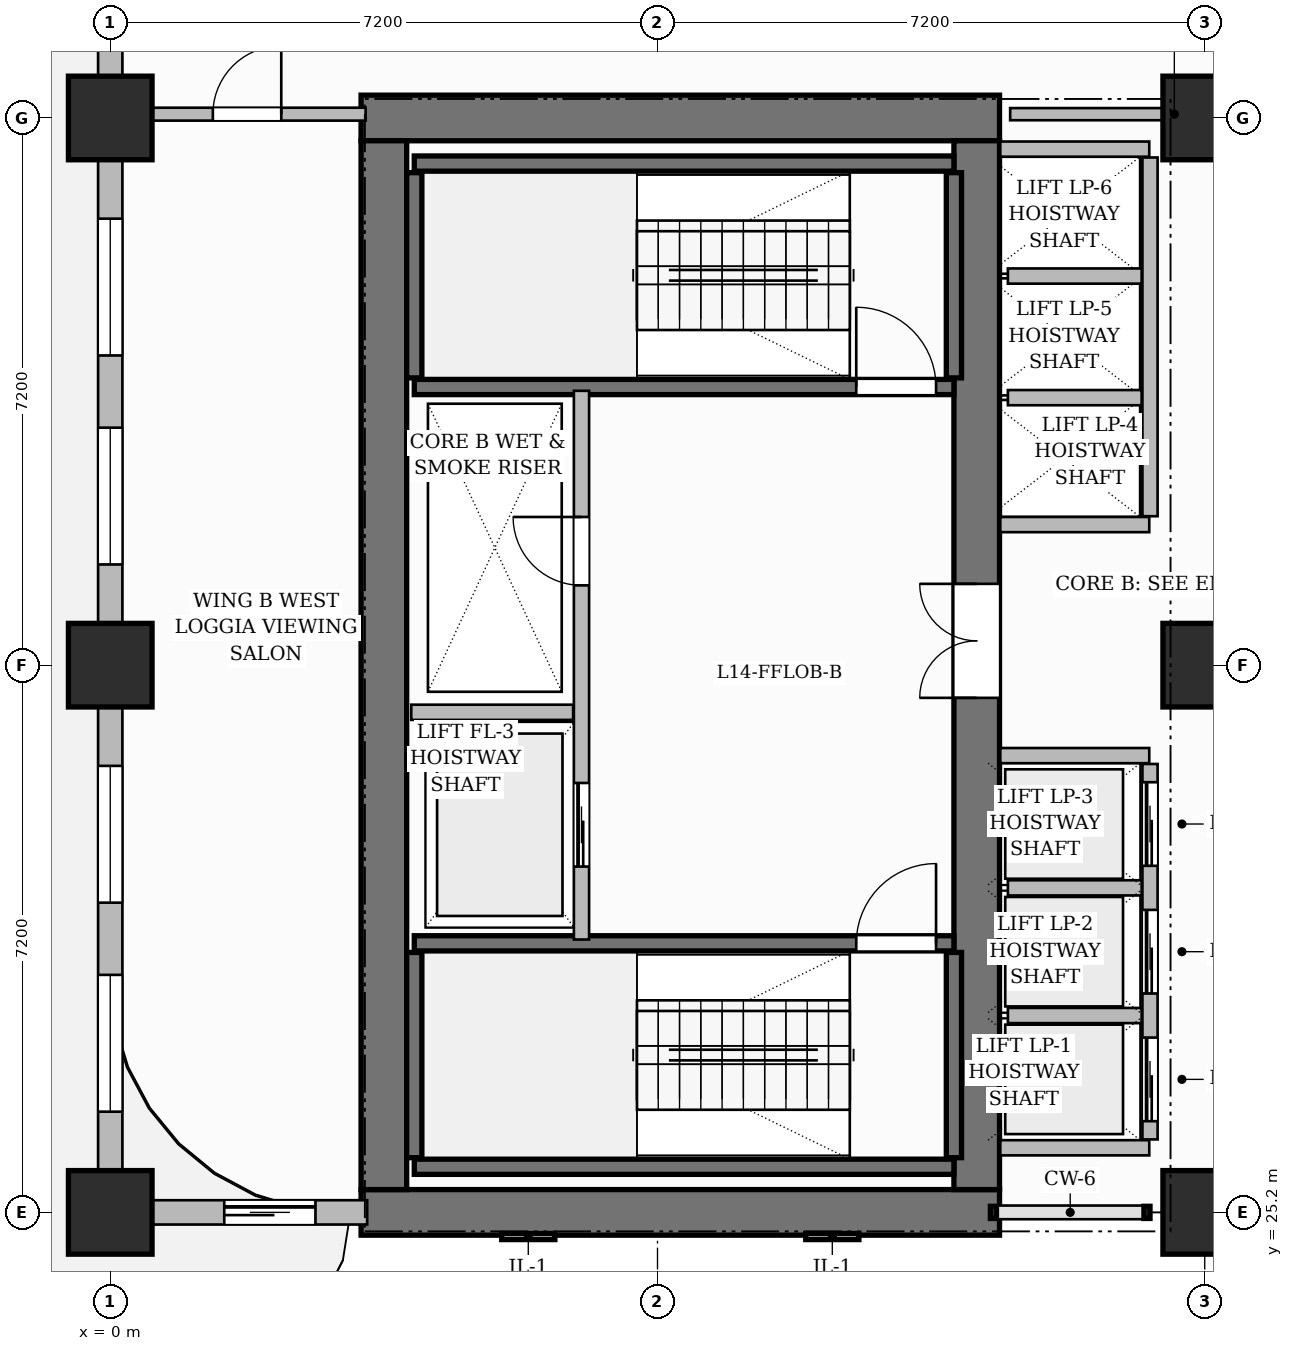
"""IFC4 building model, lengths in metres.
Left out: names, types, materials, properties, quantities, classifications, styles, units other than length and angle.
Written with IfcOpenShell. Run it as: python <this file> out.ifc"""

import sys

from ifc_helpers import new_model, si_unit, direction, frame, frame_2d, origin, origin_2d, place, context, subcontext, project, spatial, rectangle, extrude, source, transform, mapped, element, fill, save


model = new_model("IFC4")
c1 = context("Model", 3, precision=1e-05, world=origin(), true_north=direction((0.0, 1.0)))
c2 = subcontext(c1, "Body", "Model", "MODEL_VIEW")
j1 = project(units=[si_unit("LENGTHUNIT", "METRE"), si_unit("PLANEANGLEUNIT", "RADIAN")], contexts=[c1])
p1 = place(None, origin())
s1 = spatial("IfcSite", under=j1, at=p1, CompositionType="ELEMENT")
p2 = place(p1, origin())
s2 = spatial("IfcBuilding", under=s1, at=p2, CompositionType="ELEMENT")
p3 = place(p2, frame((0.0, 0.0, 62.0)))
s3 = spatial("IfcBuildingStorey", under=s2, at=p3, CompositionType="ELEMENT", Elevation=62.0)
for number, where, z_axis, x_axis in (
    (1, (3.3, 25.2, 0.0), (0.0, 0.0, 1.0), (1.0, 0.0, 0.0)),
    (2, (3.3, 39.6, 0.0), (0.0, 0.0, 1.0), (1.0, 0.0, 0.0)),
):
    element("IfcWall", number, at=place(p3, frame(where, z_axis=z_axis, x_axis=x_axis)), inside=s3, PredefinedType="SHEAR", context=c2, shape_type="SweptSolid", body=[
        extrude(rectangle(XDim=8.4, YDim=0.6, at=frame_2d((4.2, 0.0))), origin(), (0.0, 0.0, 1.0), 3.7),
    ])
p4 = place(p3, frame((3.6, 25.5, 0.0), z_axis=(0.0, 0.0, 1.0), x_axis=(0.0, 1.0, 0.0)))
e3 = element("IfcWall", 3, at=p4, inside=s3, PredefinedType="SHEAR", context=c2, shape_type="SweptSolid", body=[
    extrude(rectangle(XDim=13.8, YDim=0.6, at=frame_2d((6.9, 0.0))), origin(), (0.0, 0.0, 1.0), 3.7),
])
p5 = place(p3, frame((11.4, 25.5, 0.0), z_axis=(0.0, 0.0, 1.0), x_axis=(0.0, 1.0, 0.0)))
e4 = element("IfcWall", 4, at=p5, inside=s3, PredefinedType="SHEAR", context=c2, shape_type="SweptSolid", body=[
    extrude(rectangle(XDim=13.8, YDim=0.6, at=frame_2d((6.9, 0.0))), origin(), (0.0, 0.0, 1.0), 3.7),
])
p6 = place(p5, frame((6.47, 0.0, 0.0)))
e5 = element("IfcOpeningElement", 5, at=p6, cuts=e4, PredefinedType="OPENING", context=c2, shape_type="SweptSolid", body=[
    extrude(rectangle(XDim=1.5, YDim=2.2, at=frame_2d((0.75, 1.1))), frame((0.0, 0.31, 0.0), z_axis=(0.0, -1.0, 0.0), x_axis=(1.0, 0.0, 0.0)), (0.0, 0.0, 1.0), 0.62),
])
m1 = source(origin(), c2, "Body", "SweptSolid", [
    extrude(rectangle(XDim=1.1, YDim=1.1, at=origin_2d()), origin(), (0.0, 0.0, 1.0), 3.7),
])
for number, where, z_axis, x_axis in (
    (6, (0.0, 25.2, 0.0), (0.0, 0.0, 1.0), (1.0, 0.0, 0.0)),
    (7, (0.0, 32.4, 0.0), (0.0, 0.0, 1.0), (1.0, 0.0, 0.0)),
    (8, (0.0, 39.6, 0.0), (0.0, 0.0, 1.0), (1.0, 0.0, 0.0)),
    (9, (14.4, 25.2, 0.0), (0.0, 0.0, 1.0), (1.0, 0.0, 0.0)),
    (10, (14.4, 32.4, 0.0), (0.0, 0.0, 1.0), (1.0, 0.0, 0.0)),
    (11, (14.4, 39.6, 0.0), (0.0, 0.0, 1.0), (1.0, 0.0, 0.0)),
):
    element("IfcColumn", number, at=place(p3, frame(where, z_axis=z_axis, x_axis=x_axis)), inside=s3, PredefinedType="COLUMN", context=c2, shape_type="MappedRepresentation", body=[
        mapped(m1, transform((0.0, 0.0, 0.0), scale=1.0)),
    ])
p7 = place(p3, frame((4.0, 25.8, 0.0), z_axis=(0.0, 0.0, 1.0), x_axis=(1.0, 0.0, 0.0)))
e12 = element("IfcWall", 12, at=p7, inside=s3, PredefinedType="SHEAR", context=c2, shape_type="SweptSolid", body=[
    extrude(rectangle(XDim=7.1, YDim=0.2, at=frame_2d((3.55, 0.0))), origin(), (0.0, 0.0, 1.0), 3.7),
])
for number, where, z_axis, x_axis in (
    (13, (4.0, 25.92, 0.0), (0.0, 0.0, 1.0), (0.0, 1.0, 0.0)),
    (14, (11.1, 25.92, 0.0), (0.0, 0.0, 1.0), (0.0, 1.0, 0.0)),
):
    element("IfcWall", number, at=place(p3, frame(where, z_axis=z_axis, x_axis=x_axis)), inside=s3, PredefinedType="SHEAR", context=c2, shape_type="SweptSolid", body=[
        extrude(rectangle(XDim=2.7, YDim=0.2, at=frame_2d((1.35, 0.0))), origin(), (0.0, 0.0, 1.0), 3.7),
    ])
p8 = place(p3, frame((4.0, 28.74, 0.0), z_axis=(0.0, 0.0, 1.0), x_axis=(1.0, 0.0, 0.0)))
e15 = element("IfcWall", 15, at=p8, inside=s3, PredefinedType="SHEAR", context=c2, shape_type="SweptSolid", body=[
    extrude(rectangle(XDim=7.1, YDim=0.2, at=frame_2d((3.55, 0.0))), origin(), (0.0, 0.0, 1.0), 3.7),
])
p9 = place(p8, frame((5.815, 0.0, 0.0)))
e16 = element("IfcOpeningElement", 16, at=p9, cuts=e15, PredefinedType="OPENING", context=c2, shape_type="SweptSolid", body=[
    extrude(rectangle(XDim=1.05, YDim=2.2, at=frame_2d((0.525, 1.1))), frame((0.0, 0.11, 0.0), z_axis=(0.0, -1.0, 0.0), x_axis=(1.0, 0.0, 0.0)), (0.0, 0.0, 1.0), 0.22),
])
p10 = place(p3, frame((4.0, 39.0, 0.0), z_axis=(0.0, 0.0, 1.0), x_axis=(1.0, 0.0, 0.0)))
e17 = element("IfcWall", 17, at=p10, inside=s3, PredefinedType="SHEAR", context=c2, shape_type="SweptSolid", body=[
    extrude(rectangle(XDim=7.1, YDim=0.2, at=frame_2d((3.55, 0.0))), origin(), (0.0, 0.0, 1.0), 3.7),
])
for number, where, z_axis, x_axis in (
    (18, (4.0, 36.18, 0.0), (0.0, 0.0, 1.0), (0.0, 1.0, 0.0)),
    (19, (11.1, 36.18, 0.0), (0.0, 0.0, 1.0), (0.0, 1.0, 0.0)),
):
    element("IfcWall", number, at=place(p3, frame(where, z_axis=z_axis, x_axis=x_axis)), inside=s3, PredefinedType="SHEAR", context=c2, shape_type="SweptSolid", body=[
        extrude(rectangle(XDim=2.7, YDim=0.2, at=frame_2d((1.35, 0.0))), origin(), (0.0, 0.0, 1.0), 3.7),
    ])
p11 = place(p3, frame((4.0, 36.06, 0.0), z_axis=(0.0, 0.0, 1.0), x_axis=(1.0, 0.0, 0.0)))
e20 = element("IfcWall", 20, at=p11, inside=s3, PredefinedType="SHEAR", context=c2, shape_type="SweptSolid", body=[
    extrude(rectangle(XDim=7.1, YDim=0.2, at=frame_2d((3.55, 0.0))), origin(), (0.0, 0.0, 1.0), 3.7),
])
p12 = place(p11, frame((5.815, 0.0, 0.0)))
e21 = element("IfcOpeningElement", 21, at=p12, cuts=e20, PredefinedType="OPENING", context=c2, shape_type="SweptSolid", body=[
    extrude(rectangle(XDim=1.05, YDim=2.2, at=frame_2d((0.525, 1.1))), frame((0.0, 0.11, 0.0), z_axis=(0.0, -1.0, 0.0), x_axis=(1.0, 0.0, 0.0)), (0.0, 0.0, 1.0), 0.22),
])
p13 = place(p3, frame((6.2, 28.79, 0.0), z_axis=(0.0, 0.0, 1.0), x_axis=(0.0, 1.0, 0.0)))
e22 = element("IfcWall", 22, at=p13, inside=s3, PredefinedType="PARTITIONING", context=c2, shape_type="SweptSolid", body=[
    extrude(rectangle(XDim=7.22, YDim=0.2, at=frame_2d((3.61, 0.0))), origin(), (0.0, 0.0, 1.0), 3.45),
])
p14 = place(p13, frame((4.66, 0.0, 0.0)))
e23 = element("IfcOpeningElement", 23, at=p14, cuts=e22, PredefinedType="OPENING", context=c2, shape_type="SweptSolid", body=[
    extrude(rectangle(XDim=0.9, YDim=2.1, at=frame_2d((0.45, 1.05))), frame((0.0, 0.11, 0.0), z_axis=(0.0, -1.0, 0.0), x_axis=(1.0, 0.0, 0.0)), (0.0, 0.0, 1.0), 0.22),
])
p15 = place(p13, frame((0.96, 0.0, 0.0)))
e24 = element("IfcOpeningElement", 24, at=p15, cuts=e22, PredefinedType="OPENING", context=c2, shape_type="SweptSolid", body=[
    extrude(rectangle(XDim=1.1, YDim=2.2, at=frame_2d((0.55, 1.1))), frame((0.0, 0.11, 0.0), z_axis=(0.0, -1.0, 0.0), x_axis=(1.0, 0.0, 0.0)), (0.0, 0.0, 1.0), 0.22),
])
p16 = place(p3, frame((3.96, 31.78, 0.0), z_axis=(0.0, 0.0, 1.0), x_axis=(1.0, 0.0, 0.0)))
e25 = element("IfcWall", 25, at=p16, inside=s3, PredefinedType="PARTITIONING", context=c2, shape_type="SweptSolid", body=[
    extrude(rectangle(XDim=2.13, YDim=0.2, at=frame_2d((1.065, 0.0))), origin(), (0.0, 0.0, 1.0), 3.45),
])
for number, where, z_axis, x_axis in (
    (26, (11.71, 26.05, 0.0), (0.0, 0.0, 1.0), (1.0, 0.0, 0.0)),
    (27, (11.71, 31.21, 0.0), (0.0, 0.0, 1.0), (1.0, 0.0, 0.0)),
):
    element("IfcWall", number, at=place(p3, frame(where, z_axis=z_axis, x_axis=x_axis)), inside=s3, PredefinedType="PARTITIONING", context=c2, shape_type="SweptSolid", body=[
        extrude(rectangle(XDim=1.96, YDim=0.2, at=frame_2d((0.98, 0.0))), origin(), (0.0, 0.0, 1.0), 3.45),
    ])
p17 = place(p3, frame((13.68, 26.16, 0.0), z_axis=(0.0, 0.0, 1.0), x_axis=(0.0, 1.0, 0.0)))
e28 = element("IfcWall", 28, at=p17, inside=s3, PredefinedType="PARTITIONING", context=c2, shape_type="SweptSolid", body=[
    extrude(rectangle(XDim=4.94, YDim=0.2, at=frame_2d((2.47, 0.0))), origin(), (0.0, 0.0, 1.0), 3.45),
])
p18 = place(p17, frame((0.24, 0.0, 0.0)))
e29 = element("IfcOpeningElement", 29, at=p18, cuts=e28, PredefinedType="OPENING", context=c2, shape_type="SweptSolid", body=[
    extrude(rectangle(XDim=1.1, YDim=2.2, at=frame_2d((0.55, 1.1))), frame((0.0, 0.11, 0.0), z_axis=(0.0, -1.0, 0.0), x_axis=(1.0, 0.0, 0.0)), (0.0, 0.0, 1.0), 0.22),
])
p19 = place(p17, frame((1.92, 0.0, 0.0)))
e30 = element("IfcOpeningElement", 30, at=p19, cuts=e28, PredefinedType="OPENING", context=c2, shape_type="SweptSolid", body=[
    extrude(rectangle(XDim=1.1, YDim=2.2, at=frame_2d((0.55, 1.1))), frame((0.0, 0.11, 0.0), z_axis=(0.0, -1.0, 0.0), x_axis=(1.0, 0.0, 0.0)), (0.0, 0.0, 1.0), 0.22),
])
p20 = place(p17, frame((3.6, 0.0, 0.0)))
e31 = element("IfcOpeningElement", 31, at=p20, cuts=e28, PredefinedType="OPENING", context=c2, shape_type="SweptSolid", body=[
    extrude(rectangle(XDim=1.1, YDim=2.2, at=frame_2d((0.55, 1.1))), frame((0.0, 0.11, 0.0), z_axis=(0.0, -1.0, 0.0), x_axis=(1.0, 0.0, 0.0)), (0.0, 0.0, 1.0), 0.22),
])
for number, where, z_axis, x_axis in (
    (32, (11.81, 27.79, 0.0), (0.0, 0.0, 1.0), (1.0, 0.0, 0.0)),
    (33, (11.81, 29.47, 0.0), (0.0, 0.0, 1.0), (1.0, 0.0, 0.0)),
):
    element("IfcWall", number, at=place(p3, frame(where, z_axis=z_axis, x_axis=x_axis)), inside=s3, PredefinedType="PARTITIONING", context=c2, shape_type="SweptSolid", body=[
        extrude(rectangle(XDim=1.76, YDim=0.2, at=frame_2d((0.88, 0.0))), origin(), (0.0, 0.0, 1.0), 3.45),
    ])
for number, where, z_axis, x_axis in (
    (34, (11.71, 34.25, 0.0), (0.0, 0.0, 1.0), (1.0, 0.0, 0.0)),
    (35, (11.71, 39.19, 0.0), (0.0, 0.0, 1.0), (1.0, 0.0, 0.0)),
):
    element("IfcWall", number, at=place(p3, frame(where, z_axis=z_axis, x_axis=x_axis)), inside=s3, PredefinedType="PARTITIONING", context=c2, shape_type="SweptSolid", body=[
        extrude(rectangle(XDim=1.96, YDim=0.2, at=frame_2d((0.98, 0.0))), origin(), (0.0, 0.0, 1.0), 3.45),
    ])
p21 = place(p3, frame((13.68, 34.36, 0.0), z_axis=(0.0, 0.0, 1.0), x_axis=(0.0, 1.0, 0.0)))
e36 = element("IfcWall", 36, at=p21, inside=s3, PredefinedType="PARTITIONING", context=c2, shape_type="SweptSolid", body=[
    extrude(rectangle(XDim=4.72, YDim=0.2, at=frame_2d((2.36, 0.0))), origin(), (0.0, 0.0, 1.0), 3.45),
])
for number, where, z_axis, x_axis in (
    (37, (11.81, 35.92, 0.0), (0.0, 0.0, 1.0), (1.0, 0.0, 0.0)),
    (38, (11.81, 37.52, 0.0), (0.0, 0.0, 1.0), (1.0, 0.0, 0.0)),
):
    element("IfcWall", number, at=place(p3, frame(where, z_axis=z_axis, x_axis=x_axis)), inside=s3, PredefinedType="PARTITIONING", context=c2, shape_type="SweptSolid", body=[
        extrude(rectangle(XDim=1.76, YDim=0.2, at=frame_2d((0.88, 0.0))), origin(), (0.0, 0.0, 1.0), 3.45),
    ])
p22 = place(p3, frame((11.84, 39.65, 0.0), z_axis=(0.0, 0.0, 1.0), x_axis=(1.0, 0.0, 0.0)))
e39 = element("IfcWall", 39, at=p22, inside=s3, PredefinedType="PARTITIONING", context=c2, shape_type="SweptSolid", body=[
    extrude(rectangle(XDim=4.32, YDim=0.16, at=frame_2d((2.16, 0.0))), origin(), (0.0, 0.0, 1.0), 2.885),
])
p23 = place(p3, frame((0.24, 39.65, 0.0), z_axis=(0.0, 0.0, 1.0), x_axis=(1.0, 0.0, 0.0)))
e40 = element("IfcWall", 40, at=p23, inside=s3, PredefinedType="PARTITIONING", context=c2, shape_type="SweptSolid", body=[
    extrude(rectangle(XDim=3.12, YDim=0.17, at=frame_2d((1.56, 0.0))), origin(), (0.0, 0.0, 1.0), 3.45),
])
p24 = place(p23, frame((1.11, 0.0, 0.0)))
e41 = element("IfcOpeningElement", 41, at=p24, cuts=e40, PredefinedType="OPENING", context=c2, shape_type="SweptSolid", body=[
    extrude(rectangle(XDim=0.9, YDim=2.15, at=frame_2d((0.45, 1.075))), frame((0.0, 0.095, 0.0), z_axis=(0.0, -1.0, 0.0), x_axis=(1.0, 0.0, 0.0)), (0.0, 0.0, 1.0), 0.19),
])
p25 = place(p3, frame((0.0, 25.2, 0.0), z_axis=(0.0, 0.0, 1.0), x_axis=(1.0, 0.0, 0.0)))
e42 = element("IfcWall", 42, at=p25, inside=s3, PredefinedType="SOLIDWALL", context=c2, shape_type="SweptSolid", body=[
    extrude(rectangle(XDim=3.38, YDim=0.32, at=frame_2d((1.69, 0.0))), origin(), (0.0, 0.0, 1.0), 3.45),
])
p26 = place(p25, frame((1.5, 0.0, 0.0)))
e43 = element("IfcOpeningElement", 43, at=p26, cuts=e42, PredefinedType="OPENING", context=c2, shape_type="SweptSolid", body=[
    extrude(rectangle(XDim=1.2, YDim=2.2, at=frame_2d((0.6, 1.1))), frame((0.0, 0.17, 0.0), z_axis=(0.0, -1.0, 0.0), x_axis=(1.0, 0.0, 0.0)), (0.0, 0.0, 1.0), 0.34),
])
p27 = place(p3, frame((0.0, 25.25, 0.0), z_axis=(0.0, 0.0, 1.0), x_axis=(0.0, 1.0, 0.0)))
e44 = element("IfcWall", 44, at=p27, inside=s3, PredefinedType="SOLIDWALL", context=c2, shape_type="SweptSolid", body=[
    extrude(rectangle(XDim=21.5, YDim=0.32, at=frame_2d((10.75, 0.0))), origin(), (0.0, 0.0, 1.0), 2.885),
])
p28 = place(p27, frame((1.275, 0.0, 0.8)))
e45 = element("IfcOpeningElement", 45, at=p28, cuts=e44, PredefinedType="OPENING", context=c2, shape_type="SweptSolid", body=[
    extrude(rectangle(XDim=1.8, YDim=1.85, at=frame_2d((0.9, 0.925))), frame((0.0, 0.17, 0.0), z_axis=(0.0, -1.0, 0.0), x_axis=(1.0, 0.0, 0.0)), (0.0, 0.0, 1.0), 0.34),
])
p29 = place(p27, frame((4.025, 0.0, 0.8)))
e46 = element("IfcOpeningElement", 46, at=p29, cuts=e44, PredefinedType="OPENING", context=c2, shape_type="SweptSolid", body=[
    extrude(rectangle(XDim=1.8, YDim=1.85, at=frame_2d((0.9, 0.925))), frame((0.0, 0.17, 0.0), z_axis=(0.0, -1.0, 0.0), x_axis=(1.0, 0.0, 0.0)), (0.0, 0.0, 1.0), 0.34),
])
p30 = place(p27, frame((8.475, 0.0, 0.8)))
e47 = element("IfcOpeningElement", 47, at=p30, cuts=e44, PredefinedType="OPENING", context=c2, shape_type="SweptSolid", body=[
    extrude(rectangle(XDim=1.8, YDim=1.85, at=frame_2d((0.9, 0.925))), frame((0.0, 0.17, 0.0), z_axis=(0.0, -1.0, 0.0), x_axis=(1.0, 0.0, 0.0)), (0.0, 0.0, 1.0), 0.34),
])
p31 = place(p27, frame((11.225, 0.0, 0.8)))
e48 = element("IfcOpeningElement", 48, at=p31, cuts=e44, PredefinedType="OPENING", context=c2, shape_type="SweptSolid", body=[
    extrude(rectangle(XDim=1.8, YDim=1.85, at=frame_2d((0.9, 0.925))), frame((0.0, 0.17, 0.0), z_axis=(0.0, -1.0, 0.0), x_axis=(1.0, 0.0, 0.0)), (0.0, 0.0, 1.0), 0.34),
])
p32 = place(p27, frame((15.675, 0.0, 0.8)))
e49 = element("IfcOpeningElement", 49, at=p32, cuts=e44, PredefinedType="OPENING", context=c2, shape_type="SweptSolid", body=[
    extrude(rectangle(XDim=1.8, YDim=1.85, at=frame_2d((0.9, 0.925))), frame((0.0, 0.17, 0.0), z_axis=(0.0, -1.0, 0.0), x_axis=(1.0, 0.0, 0.0)), (0.0, 0.0, 1.0), 0.34),
])
p33 = place(p27, frame((18.425, 0.0, 0.8)))
e50 = element("IfcOpeningElement", 50, at=p33, cuts=e44, PredefinedType="OPENING", context=c2, shape_type="SweptSolid", body=[
    extrude(rectangle(XDim=1.8, YDim=1.85, at=frame_2d((0.9, 0.925))), frame((0.0, 0.17, 0.0), z_axis=(0.0, -1.0, 0.0), x_axis=(1.0, 0.0, 0.0)), (0.0, 0.0, 1.0), 0.34),
])
m2 = source(origin(), c2, "Body", "SweptSolid", [
    extrude(rectangle(XDim=1.05, YDim=2.2, at=frame_2d((0.525, 1.1))), frame((0.0, 0.025, 0.0), z_axis=(0.0, -1.0, 0.0), x_axis=(1.0, 0.0, 0.0)), (0.0, 0.0, 1.0), 0.05),
])
p34 = place(p9, origin())
e51 = element("IfcDoor", 51, at=p34, inside=s3, OperationType="SINGLE_SWING_RIGHT", PredefinedType="DOOR", context=c2, shape_type="MappedRepresentation", body=[
    mapped(m2, transform((0.0, 0.0, 0.0), scale=1.0)),
])
fill(e16, e51)
p35 = place(p12, origin())
e52 = element("IfcDoor", 52, at=p35, inside=s3, OperationType="SINGLE_SWING_LEFT", PredefinedType="DOOR", context=c2, shape_type="MappedRepresentation", body=[
    mapped(m2, transform((0.0, 0.0, 0.0), scale=1.0)),
])
fill(e21, e52)
m3 = source(origin(), c2, "Body", "SweptSolid", [
    extrude(rectangle(XDim=0.9, YDim=2.1, at=frame_2d((0.45, 1.05))), frame((0.0, 0.025, 0.0), z_axis=(0.0, -1.0, 0.0), x_axis=(1.0, 0.0, 0.0)), (0.0, 0.0, 1.0), 0.05),
])
p36 = place(p14, origin())
e53 = element("IfcDoor", 53, at=p36, inside=s3, OperationType="SINGLE_SWING_RIGHT", PredefinedType="DOOR", context=c2, shape_type="MappedRepresentation", body=[
    mapped(m3, transform((0.0, 0.0, 0.0), scale=1.0)),
])
fill(e23, e53)
m4 = source(origin(), c2, "Body", "SweptSolid", [
    extrude(rectangle(XDim=1.5, YDim=2.2, at=frame_2d((0.75, 1.1))), frame((0.0, 0.025, 0.0), z_axis=(0.0, -1.0, 0.0), x_axis=(1.0, 0.0, 0.0)), (0.0, 0.0, 1.0), 0.05),
])
p37 = place(p6, origin())
e54 = element("IfcDoor", 54, at=p37, inside=s3, OperationType="DOUBLE_DOOR_SINGLE_SWING", PredefinedType="DOOR", context=c2, shape_type="MappedRepresentation", body=[
    mapped(m4, transform((0.0, 0.0, 0.0), scale=1.0)),
])
fill(e5, e54)
m5 = source(origin(), c2, "Body", "SweptSolid", [
    extrude(rectangle(XDim=0.9, YDim=2.15, at=frame_2d((0.45, 1.075))), frame((0.0, 0.025, 0.0), z_axis=(0.0, -1.0, 0.0), x_axis=(1.0, 0.0, 0.0)), (0.0, 0.0, 1.0), 0.05),
])
p38 = place(p24, origin())
e55 = element("IfcDoor", 55, at=p38, inside=s3, OperationType="SINGLE_SWING_RIGHT", PredefinedType="DOOR", context=c2, shape_type="MappedRepresentation", body=[
    mapped(m5, transform((0.0, 0.0, 0.0), scale=1.0)),
])
fill(e41, e55)
m6 = source(origin(), c2, "Body", "SweptSolid", [
    extrude(rectangle(XDim=1.1, YDim=2.2, at=frame_2d((0.55, 1.1))), frame((0.0, 0.025, 0.0), z_axis=(0.0, -1.0, 0.0), x_axis=(1.0, 0.0, 0.0)), (0.0, 0.0, 1.0), 0.05),
])
p39 = place(p15, origin())
e56 = element("IfcDoor", 56, at=p39, inside=s3, OperationType="SLIDING_TO_LEFT", PredefinedType="DOOR", context=c2, shape_type="MappedRepresentation", body=[
    mapped(m6, transform((0.0, 0.0, 0.0), scale=1.0)),
])
fill(e24, e56)
p40 = place(p18, origin())
e57 = element("IfcDoor", 57, at=p40, inside=s3, OperationType="SLIDING_TO_LEFT", PredefinedType="DOOR", context=c2, shape_type="MappedRepresentation", body=[
    mapped(m6, transform((0.0, 0.0, 0.0), scale=1.0)),
])
fill(e29, e57)
p41 = place(p19, origin())
e58 = element("IfcDoor", 58, at=p41, inside=s3, OperationType="SLIDING_TO_LEFT", PredefinedType="DOOR", context=c2, shape_type="MappedRepresentation", body=[
    mapped(m6, transform((0.0, 0.0, 0.0), scale=1.0)),
])
fill(e30, e58)
p42 = place(p20, origin())
e59 = element("IfcDoor", 59, at=p42, inside=s3, OperationType="SLIDING_TO_LEFT", PredefinedType="DOOR", context=c2, shape_type="MappedRepresentation", body=[
    mapped(m6, transform((0.0, 0.0, 0.0), scale=1.0)),
])
fill(e31, e59)
m7 = source(origin(), c2, "Body", "SweptSolid", [
    extrude(rectangle(XDim=1.2, YDim=2.2, at=frame_2d((0.6, 1.1))), frame((0.0, 0.025, 0.0), z_axis=(0.0, -1.0, 0.0), x_axis=(1.0, 0.0, 0.0)), (0.0, 0.0, 1.0), 0.05),
])
p43 = place(p26, origin())
e60 = element("IfcDoor", 60, at=p43, inside=s3, OperationType="SLIDING_TO_LEFT", PredefinedType="DOOR", context=c2, shape_type="MappedRepresentation", body=[
    mapped(m7, transform((0.0, 0.0, 0.0), scale=1.0)),
])
fill(e43, e60)
m8 = source(origin(), c2, "Body", "SweptSolid", [
    extrude(rectangle(XDim=1.8, YDim=1.85, at=frame_2d((0.9, 0.925))), frame((0.0, 0.03, 0.0), z_axis=(0.0, -1.0, 0.0), x_axis=(1.0, 0.0, 0.0)), (0.0, 0.0, 1.0), 0.06),
])
p44 = place(p28, origin())
e61 = element("IfcWindow", 61, at=p44, inside=s3, PartitioningType="DOUBLE_PANEL_VERTICAL", PredefinedType="WINDOW", context=c2, shape_type="MappedRepresentation", body=[
    mapped(m8, transform((0.0, 0.0, 0.0), scale=1.0)),
])
fill(e45, e61)
p45 = place(p29, origin())
e62 = element("IfcWindow", 62, at=p45, inside=s3, PartitioningType="DOUBLE_PANEL_VERTICAL", PredefinedType="WINDOW", context=c2, shape_type="MappedRepresentation", body=[
    mapped(m8, transform((0.0, 0.0, 0.0), scale=1.0)),
])
fill(e46, e62)
p46 = place(p30, origin())
e63 = element("IfcWindow", 63, at=p46, inside=s3, PartitioningType="DOUBLE_PANEL_VERTICAL", PredefinedType="WINDOW", context=c2, shape_type="MappedRepresentation", body=[
    mapped(m8, transform((0.0, 0.0, 0.0), scale=1.0)),
])
fill(e47, e63)
p47 = place(p31, origin())
e64 = element("IfcWindow", 64, at=p47, inside=s3, PartitioningType="DOUBLE_PANEL_VERTICAL", PredefinedType="WINDOW", context=c2, shape_type="MappedRepresentation", body=[
    mapped(m8, transform((0.0, 0.0, 0.0), scale=1.0)),
])
fill(e48, e64)
save(model, sys.argv[1])
